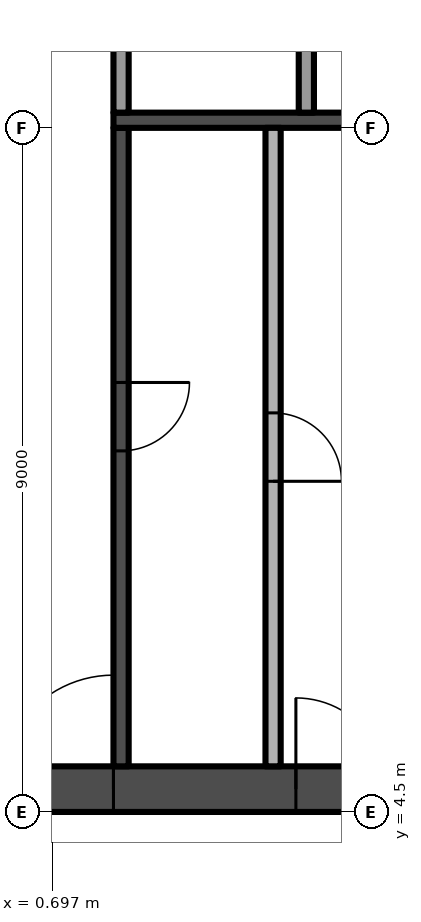
"""IFC4 building model, lengths in metres.
Left out: names, types, materials, properties, quantities, classifications, styles, units other than length and angle.
Written with IfcOpenShell. Run it as: python <this file> out.ifc"""

import sys

from ifc_helpers import new_model, si_unit, direction, frame, frame_2d, origin, place, context, subcontext, project, spatial, rectangle, extrude, element, fill, save


model = new_model("IFC4")
c1 = context("Model", 3, precision=1e-05, world=origin(), true_north=direction((0.0, 1.0)))
c2 = subcontext(c1, "Body", "Model", "MODEL_VIEW")
j1 = project(units=[si_unit("LENGTHUNIT", "METRE"), si_unit("PLANEANGLEUNIT", "RADIAN")], contexts=[c1])
p1 = place(None, origin())
s1 = spatial("IfcSite", under=j1, at=p1, CompositionType="ELEMENT")
p2 = place(p1, origin())
s2 = spatial("IfcBuilding", under=s1, at=p2, CompositionType="ELEMENT")
p3 = place(p2, frame((0.0, 0.0, 184.4)))
s3 = spatial("IfcBuildingStorey", under=s2, at=p3, CompositionType="ELEMENT", Elevation=184.4)
p4 = place(p3, frame((-13.5, 4.8, -0.3), z_axis=(0.0, 0.0, 1.0), x_axis=(1.0, 0.0, 0.0)))
e1 = element("IfcWall", 1, at=p4, inside=s3, PredefinedType="SHEAR", context=c2, shape_type="SweptSolid", body=[
    extrude(rectangle(XDim=27.0, YDim=0.6, at=frame_2d((13.5, 0.0))), origin(), (0.0, 0.0, 1.0), 3.8),
])
p5 = place(p4, frame((12.0, 0.0, 0.3)))
e2 = element("IfcOpeningElement", 2, at=p5, cuts=e1, PredefinedType="OPENING", context=c2, shape_type="SweptSolid", body=[
    extrude(rectangle(XDim=3.0, YDim=2.4, at=frame_2d((1.5, 1.2))), frame((0.0, 0.31, 0.0), z_axis=(0.0, -1.0, 0.0), x_axis=(1.0, 0.0, 0.0)), (0.0, 0.0, 1.0), 0.62),
])
p6 = place(p4, frame((4.9, 0.0, 0.3)))
e3 = element("IfcOpeningElement", 3, at=p6, cuts=e1, PredefinedType="OPENING", context=c2, shape_type="SweptSolid", body=[
    extrude(rectangle(XDim=1.2, YDim=2.2, at=frame_2d((0.6, 1.1))), frame((0.0, 0.31, 0.0), z_axis=(0.0, -1.0, 0.0), x_axis=(1.0, 0.0, 0.0)), (0.0, 0.0, 1.0), 0.62),
])
p7 = place(p4, frame((20.75, 0.0, 0.3)))
e4 = element("IfcOpeningElement", 4, at=p7, cuts=e1, PredefinedType="OPENING", context=c2, shape_type="SweptSolid", body=[
    extrude(rectangle(XDim=1.5, YDim=2.2, at=frame_2d((0.75, 1.1))), frame((0.0, 0.31, 0.0), z_axis=(0.0, -1.0, 0.0), x_axis=(1.0, 0.0, 0.0)), (0.0, 0.0, 1.0), 0.62),
])
p8 = place(p4, frame((17.4, 0.0, 0.3)))
e5 = element("IfcOpeningElement", 5, at=p8, cuts=e1, PredefinedType="OPENING", context=c2, shape_type="SweptSolid", body=[
    extrude(rectangle(XDim=1.2, YDim=2.2, at=frame_2d((0.6, 1.1))), frame((0.0, 0.31, 0.0), z_axis=(0.0, -1.0, 0.0), x_axis=(1.0, 0.0, 0.0)), (0.0, 0.0, 1.0), 0.62),
])
p9 = place(p3, frame((1.6, 13.5, 0.0), z_axis=(0.0, 0.0, 1.0), x_axis=(0.0, -1.0, 0.0)))
e6 = element("IfcWall", 6, at=p9, inside=s3, PredefinedType="SHEAR", context=c2, shape_type="SweptSolid", body=[
    extrude(rectangle(XDim=8.4, YDim=0.2, at=frame_2d((4.2, 0.0))), origin(), (0.0, 0.0, 1.0), 3.5),
])
p10 = place(p9, frame((3.35, 0.0, 0.0)))
e7 = element("IfcOpeningElement", 7, at=p10, cuts=e6, PredefinedType="OPENING", context=c2, shape_type="SweptSolid", body=[
    extrude(rectangle(XDim=0.9, YDim=2.1, at=frame_2d((0.45, 1.05))), frame((0.0, 0.11, 0.0), z_axis=(0.0, -1.0, 0.0), x_axis=(1.0, 0.0, 0.0)), (0.0, 0.0, 1.0), 0.22),
])
p11 = place(p3, frame((1.5, 13.6, 0.0), z_axis=(0.0, 0.0, 1.0), x_axis=(1.0, 0.0, 0.0)))
e8 = element("IfcWall", 8, at=p11, inside=s3, PredefinedType="SHEAR", context=c2, shape_type="SweptSolid", body=[
    extrude(rectangle(XDim=5.075, YDim=0.2, at=frame_2d((2.538, 0.0))), origin(), (0.0, 0.0, 1.0), 3.5),
])
p12 = place(p3, frame((1.6, 13.7, 0.0), z_axis=(0.0, 0.0, 1.0), x_axis=(0.0, 1.0, 0.0)))
e9 = element("IfcWall", 9, at=p12, inside=s3, PredefinedType="PARTITIONING", context=c2, shape_type="SweptSolid", body=[
    extrude(rectangle(XDim=2.2, YDim=0.2, at=frame_2d((1.1, 0.0))), origin(), (0.0, 0.0, 1.0), 3.5),
])
p13 = place(p3, frame((3.6, 13.5, 0.0), z_axis=(0.0, 0.0, 1.0), x_axis=(0.0, -1.0, 0.0)))
e10 = element("IfcWall", 10, at=p13, inside=s3, PredefinedType="PARTITIONING", context=c2, shape_type="SweptSolid", body=[
    extrude(rectangle(XDim=8.4, YDim=0.2, at=frame_2d((4.2, 0.0))), origin(), (0.0, 0.0, 1.0), 3.5),
])
p14 = place(p13, frame((3.75, 0.0, 0.0)))
e11 = element("IfcOpeningElement", 11, at=p14, cuts=e10, PredefinedType="OPENING", context=c2, shape_type="SweptSolid", body=[
    extrude(rectangle(XDim=0.9, YDim=2.1, at=frame_2d((0.45, 1.05))), frame((0.0, 0.11, 0.0), z_axis=(0.0, -1.0, 0.0), x_axis=(1.0, 0.0, 0.0)), (0.0, 0.0, 1.0), 0.22),
])
p15 = place(p3, frame((4.037, 13.7, 0.0), z_axis=(0.0, 0.0, 1.0), x_axis=(0.0, 1.0, 0.0)))
e12 = element("IfcWall", 12, at=p15, inside=s3, PredefinedType="PARTITIONING", context=c2, shape_type="SweptSolid", body=[
    extrude(rectangle(XDim=2.2, YDim=0.2, at=frame_2d((1.1, 0.0))), origin(), (0.0, 0.0, 1.0), 3.5),
])
p16 = place(p5, frame((3.0, 0.0, 0.0), z_axis=(0.0, 0.0, 1.0), x_axis=(-1.0, 0.0, 0.0)))
e13 = element("IfcDoor", 13, at=p16, inside=s3, OperationType="DOUBLE_DOOR_SINGLE_SWING", PredefinedType="DOOR", context=c2, shape_type="SweptSolid", body=[
    extrude(rectangle(XDim=3.0, YDim=2.4, at=frame_2d((1.5, 1.2))), frame((0.0, 0.025, 0.0), z_axis=(0.0, -1.0, 0.0), x_axis=(1.0, 0.0, 0.0)), (0.0, 0.0, 1.0), 0.05),
])
fill(e2, e13)
p17 = place(p8, frame((1.2, 0.0, 0.0), z_axis=(0.0, 0.0, 1.0), x_axis=(-1.0, 0.0, 0.0)))
e14 = element("IfcDoor", 14, at=p17, inside=s3, OperationType="SINGLE_SWING_RIGHT", PredefinedType="DOOR", context=c2, shape_type="SweptSolid", body=[
    extrude(rectangle(XDim=1.2, YDim=2.2, at=frame_2d((0.6, 1.1))), frame((0.0, 0.025, 0.0), z_axis=(0.0, -1.0, 0.0), x_axis=(1.0, 0.0, 0.0)), (0.0, 0.0, 1.0), 0.05),
])
fill(e5, e14)
p18 = place(p10, origin())
e15 = element("IfcDoor", 15, at=p18, inside=s3, OperationType="SINGLE_SWING_LEFT", PredefinedType="DOOR", context=c2, shape_type="SweptSolid", body=[
    extrude(rectangle(XDim=0.9, YDim=2.1, at=frame_2d((0.45, 1.05))), frame((0.0, 0.025, 0.0), z_axis=(0.0, -1.0, 0.0), x_axis=(1.0, 0.0, 0.0)), (0.0, 0.0, 1.0), 0.05),
])
fill(e7, e15)
p19 = place(p14, origin())
e16 = element("IfcDoor", 16, at=p19, inside=s3, OperationType="SINGLE_SWING_RIGHT", PredefinedType="DOOR", context=c2, shape_type="SweptSolid", body=[
    extrude(rectangle(XDim=0.9, YDim=2.1, at=frame_2d((0.45, 1.05))), frame((0.0, 0.025, 0.0), z_axis=(0.0, -1.0, 0.0), x_axis=(1.0, 0.0, 0.0)), (0.0, 0.0, 1.0), 0.05),
])
fill(e11, e16)
save(model, sys.argv[1])
